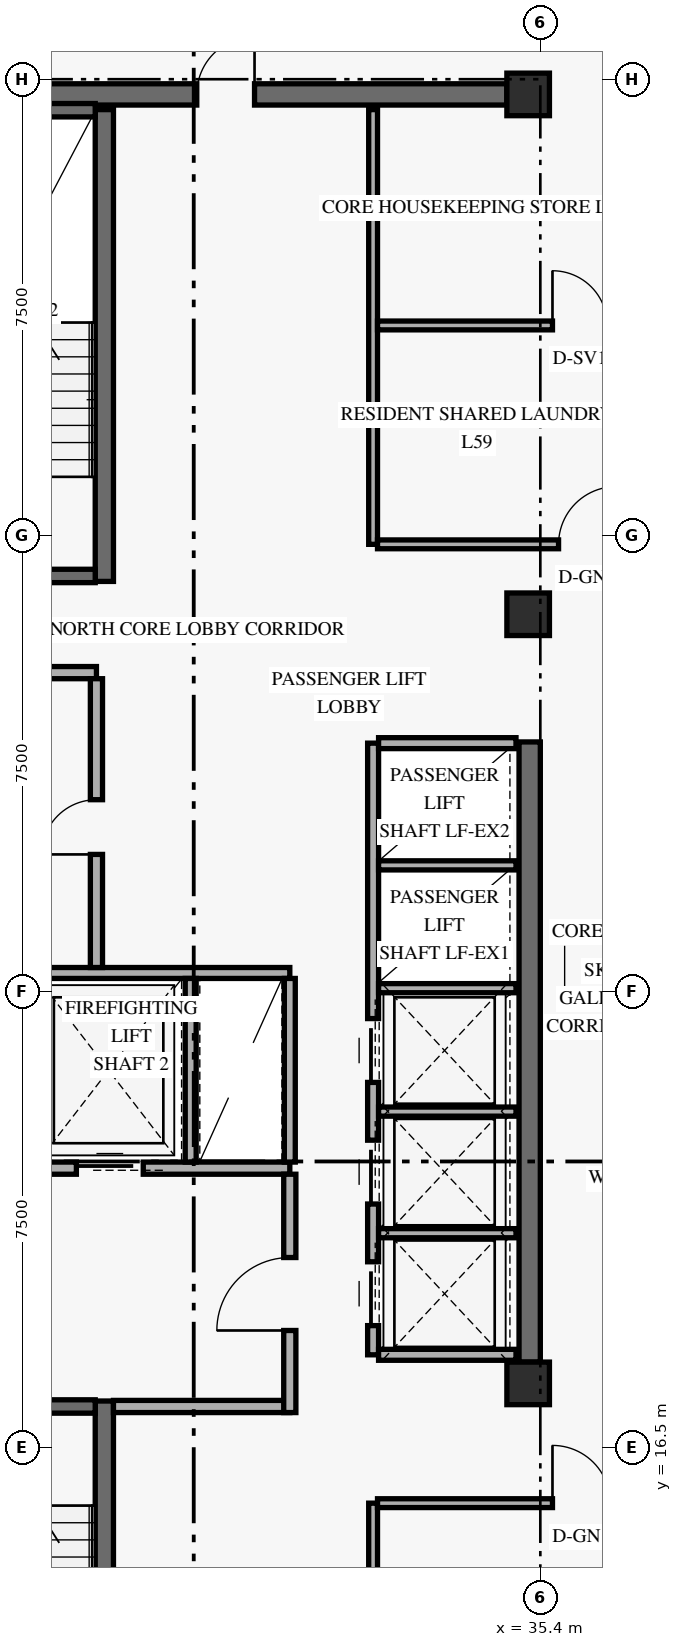
"""IFC4 building model, lengths in metres.
Left out: names, types, materials, properties, quantities, classifications, styles, units other than length and angle.
Written with IfcOpenShell. Run it as: python <this file> out.ifc"""

import sys

from ifc_helpers import new_model, si_unit, direction, frame, frame_2d, origin, origin_2d, place, context, subcontext, project, spatial, rectangle, extrude, element, fill, save


model = new_model("IFC4")
c1 = context("Model", 3, precision=1e-05, world=origin(), true_north=direction((0.0, 1.0)))
c2 = subcontext(c1, "Body", "Model", "MODEL_VIEW")
j1 = project(units=[si_unit("LENGTHUNIT", "METRE"), si_unit("PLANEANGLEUNIT", "RADIAN")], contexts=[c1])
p1 = place(None, origin())
s1 = spatial("IfcSite", under=j1, at=p1, CompositionType="ELEMENT")
p2 = place(p1, origin())
s2 = spatial("IfcBuilding", under=s1, at=p2, CompositionType="ELEMENT")
p3 = place(p2, frame((0.0, 0.0, 227.4)))
s3 = spatial("IfcBuildingStorey", under=s2, at=p3, CompositionType="ELEMENT", Elevation=227.4)
p4 = place(p3, frame((35.225, 17.9, 0.0), z_axis=(0.0, 0.0, 1.0), x_axis=(0.0, 1.0, 0.0)))
e1 = element("IfcWall", 1, at=p4, inside=s3, PredefinedType="SHEAR", context=c2, shape_type="SweptSolid", body=[
    extrude(rectangle(XDim=10.2, YDim=0.35, at=frame_2d((5.1, 0.0))), origin(), (0.0, 0.0, 1.0), 2.811),
])
p5 = place(p3, frame((24.55, 38.75, 0.0), z_axis=(0.0, 0.0, 1.0), x_axis=(1.0, 0.0, 0.0)))
e2 = element("IfcWall", 2, at=p5, inside=s3, PredefinedType="SHEAR", context=c2, shape_type="SweptSolid", body=[
    extrude(rectangle(XDim=10.3, YDim=0.35, at=frame_2d((5.15, 0.0))), origin(), (0.0, 0.0, 1.0), 3.35),
])
p6 = place(p5, frame((5.2, 0.0, 0.0)))
e3 = element("IfcOpeningElement", 3, at=p6, cuts=e2, PredefinedType="OPENING", context=c2, shape_type="SweptSolid", body=[
    extrude(rectangle(XDim=0.95, YDim=2.15, at=frame_2d((0.475, 1.075))), frame((0.0, 0.185, 0.0), z_axis=(0.0, -1.0, 0.0), x_axis=(1.0, 0.0, 0.0)), (0.0, 0.0, 1.0), 0.37),
])
p7 = place(p3, frame((28.23, 9.5, 0.0), z_axis=(0.0, 0.0, 1.0), x_axis=(0.0, 1.0, 0.0)))
e4 = element("IfcWall", 4, at=p7, inside=s3, PredefinedType="SHEAR", context=c2, shape_type="SweptSolid", body=[
    extrude(rectangle(XDim=7.76, YDim=0.3, at=frame_2d((3.88, 0.0))), origin(), (0.0, 0.0, 1.0), 3.35),
])
p8 = place(p3, frame((24.92, 17.17, 0.0), z_axis=(0.0, 0.0, 1.0), x_axis=(1.0, 0.0, 0.0)))
e5 = element("IfcWall", 5, at=p8, inside=s3, PredefinedType="SHEAR", context=c2, shape_type="SweptSolid", body=[
    extrude(rectangle(XDim=3.16, YDim=0.22, at=frame_2d((1.58, 0.0))), origin(), (0.0, 0.0, 1.0), 3.35),
])
p9 = place(p8, frame((0.78, 0.0, 0.0)))
e6 = element("IfcOpeningElement", 6, at=p9, cuts=e5, PredefinedType="OPENING", context=c2, shape_type="SweptSolid", body=[
    extrude(rectangle(XDim=1.05, YDim=2.15, at=frame_2d((0.525, 1.075))), frame((0.0, 0.12, 0.0), z_axis=(0.0, -1.0, 0.0), x_axis=(1.0, 0.0, 0.0)), (0.0, 0.0, 1.0), 0.24),
])
p10 = place(p3, frame((28.23, 30.74, 0.0), z_axis=(0.0, 0.0, 1.0), x_axis=(0.0, 1.0, 0.0)))
e7 = element("IfcWall", 7, at=p10, inside=s3, PredefinedType="SHEAR", context=c2, shape_type="SweptSolid", body=[
    extrude(rectangle(XDim=7.76, YDim=0.3, at=frame_2d((3.88, 0.0))), origin(), (0.0, 0.0, 1.0), 3.35),
])
p11 = place(p3, frame((24.92, 30.83, 0.0), z_axis=(0.0, 0.0, 1.0), x_axis=(1.0, 0.0, 0.0)))
e8 = element("IfcWall", 8, at=p11, inside=s3, PredefinedType="SHEAR", context=c2, shape_type="SweptSolid", body=[
    extrude(rectangle(XDim=3.16, YDim=0.22, at=frame_2d((1.58, 0.0))), origin(), (0.0, 0.0, 1.0), 3.35),
])
p12 = place(p11, frame((0.78, 0.0, 0.0)))
e9 = element("IfcOpeningElement", 9, at=p12, cuts=e8, PredefinedType="OPENING", context=c2, shape_type="SweptSolid", body=[
    extrude(rectangle(XDim=1.05, YDim=2.15, at=frame_2d((0.525, 1.075))), frame((0.0, 0.12, 0.0), z_axis=(0.0, -1.0, 0.0), x_axis=(1.0, 0.0, 0.0)), (0.0, 0.0, 1.0), 0.24),
])
p13 = place(p3, frame((24.92, 38.49, 0.0), z_axis=(0.0, 0.0, 1.0), x_axis=(1.0, 0.0, 0.0)))
e10 = element("IfcWall", 10, at=p13, inside=s3, PredefinedType="SHEAR", context=c2, shape_type="SweptSolid", body=[
    extrude(rectangle(XDim=3.16, YDim=0.22, at=frame_2d((1.58, 0.0))), origin(), (0.0, 0.0, 1.0), 3.35),
])
for number, where, z_axis, x_axis in (
    (11, (35.2, 17.55, 0.0), (0.0, 0.0, 1.0), (1.0, 0.0, 0.0)),
    (12, (35.2, 30.2, 0.0), (0.0, 0.0, 1.0), (1.0, 0.0, 0.0)),
    (13, (35.2, 38.75, 0.0), (0.0, 0.0, 1.0), (1.0, 0.0, 0.0)),
):
    element("IfcColumn", number, at=place(p3, frame(where, z_axis=z_axis, x_axis=x_axis)), inside=s3, PredefinedType="COLUMN", context=c2, shape_type="SweptSolid", body=[
        extrude(rectangle(XDim=0.7, YDim=0.7, at=origin_2d()), origin(), (0.0, 0.0, 1.0), 3.6),
    ])
p14 = place(p3, frame((24.45, 21.09, 0.0), z_axis=(0.0, 0.0, 1.0), x_axis=(1.0, 0.0, 0.0)))
e14 = element("IfcWall", 14, at=p14, inside=s3, PredefinedType="STANDARD", context=c2, shape_type="SweptSolid", body=[
    extrude(rectangle(XDim=6.83, YDim=0.2, at=frame_2d((3.415, 0.0))), origin(), (0.0, 0.0, 1.0), 3.35),
])
p15 = place(p14, frame((0.72, 0.0, 0.0)))
e15 = element("IfcOpeningElement", 15, at=p15, cuts=e14, PredefinedType="OPENING", context=c2, shape_type="SweptSolid", body=[
    extrude(rectangle(XDim=1.1, YDim=2.2, at=frame_2d((0.55, 1.1))), frame((0.0, 0.11, 0.0), z_axis=(0.0, -1.0, 0.0), x_axis=(1.0, 0.0, 0.0)), (0.0, 0.0, 1.0), 0.22),
])
p16 = place(p14, frame((3.32, 0.0, 0.0)))
e16 = element("IfcOpeningElement", 16, at=p16, cuts=e14, PredefinedType="OPENING", context=c2, shape_type="SweptSolid", body=[
    extrude(rectangle(XDim=1.1, YDim=2.2, at=frame_2d((0.55, 1.1))), frame((0.0, 0.11, 0.0), z_axis=(0.0, -1.0, 0.0), x_axis=(1.0, 0.0, 0.0)), (0.0, 0.0, 1.0), 0.22),
])
p17 = place(p3, frame((28.38, 17.17, 0.0), z_axis=(0.0, 0.0, 1.0), x_axis=(1.0, 0.0, 0.0)))
e17 = element("IfcWall", 17, at=p17, inside=s3, PredefinedType="STANDARD", context=c2, shape_type="SweptSolid", body=[
    extrude(rectangle(XDim=2.9, YDim=0.2, at=frame_2d((1.45, 0.0))), origin(), (0.0, 0.0, 1.0), 3.35),
])
p18 = place(p3, frame((31.28, 17.07, 0.0), z_axis=(0.0, 0.0, 1.0), x_axis=(0.0, 1.0, 0.0)))
e18 = element("IfcWall", 18, at=p18, inside=s3, PredefinedType="STANDARD", context=c2, shape_type="SweptSolid", body=[
    extrude(rectangle(XDim=3.92, YDim=0.2, at=frame_2d((1.96, 0.0))), origin(), (0.0, 0.0, 1.0), 2.793),
])
p19 = place(p18, frame((1.35, 0.0, 0.0)))
e19 = element("IfcOpeningElement", 19, at=p19, cuts=e18, PredefinedType="OPENING", context=c2, shape_type="SweptSolid", body=[
    extrude(rectangle(XDim=1.2, YDim=2.15, at=frame_2d((0.6, 1.075))), frame((0.0, 0.11, 0.0), z_axis=(0.0, -1.0, 0.0), x_axis=(1.0, 0.0, 0.0)), (0.0, 0.0, 1.0), 0.22),
])
p20 = place(p3, frame((24.45, 24.3, 0.0), z_axis=(0.0, 0.0, 1.0), x_axis=(1.0, 0.0, 0.0)))
e20 = element("IfcWall", 20, at=p20, inside=s3, PredefinedType="STANDARD", context=c2, shape_type="SweptSolid", body=[
    extrude(rectangle(XDim=6.83, YDim=0.18, at=frame_2d((3.415, 0.0))), origin(), (0.0, 0.0, 1.0), 3.35),
])
for number, where, z_axis, x_axis in (
    (21, (29.65, 21.19, 0.0), (0.0, 0.0, 1.0), (0.0, 1.0, 0.0)),
    (22, (31.28, 21.19, 0.0), (0.0, 0.0, 1.0), (0.0, 1.0, 0.0)),
):
    element("IfcWall", number, at=place(p3, frame(where, z_axis=z_axis, x_axis=x_axis)), inside=s3, PredefinedType="STANDARD", context=c2, shape_type="SweptSolid", body=[
        extrude(rectangle(XDim=3.02, YDim=0.18, at=frame_2d((1.51, 0.0))), origin(), (0.0, 0.0, 1.0), 3.35),
    ])
p21 = place(p3, frame((24.45, 29.24, 0.0), z_axis=(0.0, 0.0, 1.0), x_axis=(1.0, 0.0, 0.0)))
e23 = element("IfcWall", 23, at=p21, inside=s3, PredefinedType="STANDARD", context=c2, shape_type="SweptSolid", body=[
    extrude(rectangle(XDim=3.65, YDim=0.2, at=frame_2d((1.825, 0.0))), origin(), (0.0, 0.0, 1.0), 3.35),
])
p22 = place(p3, frame((28.1, 24.39, 0.0), z_axis=(0.0, 0.0, 1.0), x_axis=(0.0, 1.0, 0.0)))
e24 = element("IfcWall", 24, at=p22, inside=s3, PredefinedType="STANDARD", context=c2, shape_type="SweptSolid", body=[
    extrude(rectangle(XDim=4.75, YDim=0.2, at=frame_2d((2.375, 0.0))), origin(), (0.0, 0.0, 1.0), 3.35),
])
p23 = place(p22, frame((1.86, 0.0, 0.0)))
e25 = element("IfcOpeningElement", 25, at=p23, cuts=e24, PredefinedType="OPENING", context=c2, shape_type="SweptSolid", body=[
    extrude(rectangle(XDim=0.9, YDim=2.1, at=frame_2d((0.45, 1.05))), frame((0.0, 0.11, 0.0), z_axis=(0.0, -1.0, 0.0), x_axis=(1.0, 0.0, 0.0)), (0.0, 0.0, 1.0), 0.22),
])
p24 = place(p3, frame((32.65, 18.02, 0.0), z_axis=(0.0, 0.0, 1.0), x_axis=(0.0, 1.0, 0.0)))
e26 = element("IfcWall", 26, at=p24, inside=s3, PredefinedType="STANDARD", context=c2, shape_type="SweptSolid", body=[
    extrude(rectangle(XDim=10.06, YDim=0.18, at=frame_2d((5.03, 0.0))), origin(), (0.0, 0.0, 1.0), 3.35),
])
p25 = place(p24, frame((0.48, 0.0, 0.0)))
e27 = element("IfcOpeningElement", 27, at=p25, cuts=e26, PredefinedType="OPENING", context=c2, shape_type="SweptSolid", body=[
    extrude(rectangle(XDim=1.05, YDim=2.2, at=frame_2d((0.525, 1.1))), frame((0.0, 0.1, 0.0), z_axis=(0.0, -1.0, 0.0), x_axis=(1.0, 0.0, 0.0)), (0.0, 0.0, 1.0), 0.2),
])
p26 = place(p24, frame((2.48, 0.0, 0.0)))
e28 = element("IfcOpeningElement", 28, at=p26, cuts=e26, PredefinedType="OPENING", context=c2, shape_type="SweptSolid", body=[
    extrude(rectangle(XDim=1.05, YDim=2.2, at=frame_2d((0.525, 1.1))), frame((0.0, 0.1, 0.0), z_axis=(0.0, -1.0, 0.0), x_axis=(1.0, 0.0, 0.0)), (0.0, 0.0, 1.0), 0.2),
])
p27 = place(p24, frame((4.48, 0.0, 0.0)))
e29 = element("IfcOpeningElement", 29, at=p27, cuts=e26, PredefinedType="OPENING", context=c2, shape_type="SweptSolid", body=[
    extrude(rectangle(XDim=1.05, YDim=2.2, at=frame_2d((0.525, 1.1))), frame((0.0, 0.1, 0.0), z_axis=(0.0, -1.0, 0.0), x_axis=(1.0, 0.0, 0.0)), (0.0, 0.0, 1.0), 0.2),
])
for number, where, z_axis, x_axis in (
    (30, (32.74, 18.02, 0.0), (0.0, 0.0, 1.0), (1.0, 0.0, 0.0)),
    (31, (32.74, 28.08, 0.0), (0.0, 0.0, 1.0), (1.0, 0.0, 0.0)),
):
    element("IfcWall", number, at=place(p3, frame(where, z_axis=z_axis, x_axis=x_axis)), inside=s3, PredefinedType="STANDARD", context=c2, shape_type="SweptSolid", body=[
        extrude(rectangle(XDim=2.26, YDim=0.18, at=frame_2d((1.13, 0.0))), origin(), (0.0, 0.0, 1.0), 3.35),
    ])
for number, where, z_axis, x_axis in (
    (32, (32.74, 20.02, 0.0), (0.0, 0.0, 1.0), (1.0, 0.0, 0.0)),
    (33, (32.74, 22.02, 0.0), (0.0, 0.0, 1.0), (1.0, 0.0, 0.0)),
    (34, (32.74, 24.05, 0.0), (0.0, 0.0, 1.0), (1.0, 0.0, 0.0)),
    (35, (32.74, 26.07, 0.0), (0.0, 0.0, 1.0), (1.0, 0.0, 0.0)),
):
    element("IfcWall", number, at=place(p3, frame(where, z_axis=z_axis, x_axis=x_axis)), inside=s3, PredefinedType="STANDARD", context=c2, shape_type="SweptSolid", body=[
        extrude(rectangle(XDim=2.26, YDim=0.15, at=frame_2d((1.13, 0.0))), origin(), (0.0, 0.0, 1.0), 3.35),
    ])
p28 = place(p3, frame((32.65, 9.5, 0.0), z_axis=(0.0, 0.0, 1.0), x_axis=(0.0, 1.0, 0.0)))
e36 = element("IfcWall", 36, at=p28, inside=s3, PredefinedType="PARTITIONING", context=c2, shape_type="SweptSolid", body=[
    extrude(rectangle(XDim=6.08, YDim=0.145, at=frame_2d((3.04, 0.0))), origin(), (0.0, 0.0, 1.0), 3.35),
])
p29 = place(p3, frame((32.722, 15.58, 0.0), z_axis=(0.0, 0.0, 1.0), x_axis=(1.0, 0.0, 0.0)))
e37 = element("IfcWall", 37, at=p29, inside=s3, PredefinedType="PARTITIONING", context=c2, shape_type="SweptSolid", body=[
    extrude(rectangle(XDim=5.628, YDim=0.145, at=frame_2d((2.814, 0.0))), origin(), (0.0, 0.0, 1.0), 2.793),
])
p30 = place(p29, frame((2.877, 0.0, 0.0)))
e38 = element("IfcOpeningElement", 38, at=p30, cuts=e37, PredefinedType="OPENING", context=c2, shape_type="SweptSolid", body=[
    extrude(rectangle(XDim=0.95, YDim=2.15, at=frame_2d((0.475, 1.075))), frame((0.0, 0.083, 0.0), z_axis=(0.0, -1.0, 0.0), x_axis=(1.0, 0.0, 0.0)), (0.0, 0.0, 1.0), 0.165),
])
p31 = place(p3, frame((32.65, 31.35, 0.0), z_axis=(0.0, 0.0, 1.0), x_axis=(0.0, 1.0, 0.0)))
e39 = element("IfcWall", 39, at=p31, inside=s3, PredefinedType="PARTITIONING", context=c2, shape_type="SweptSolid", body=[
    extrude(rectangle(XDim=7.15, YDim=0.145, at=frame_2d((3.575, 0.0))), origin(), (0.0, 0.0, 1.0), 3.35),
])
p32 = place(p3, frame((32.722, 31.35, 0.0), z_axis=(0.0, 0.0, 1.0), x_axis=(1.0, 0.0, 0.0)))
e40 = element("IfcWall", 40, at=p32, inside=s3, PredefinedType="PARTITIONING", context=c2, shape_type="SweptSolid", body=[
    extrude(rectangle(XDim=6.177, YDim=0.145, at=frame_2d((3.089, 0.0))), origin(), (0.0, 0.0, 1.0), 2.793),
])
p33 = place(p32, frame((2.978, 0.0, 0.0)))
e41 = element("IfcOpeningElement", 41, at=p33, cuts=e40, PredefinedType="OPENING", context=c2, shape_type="SweptSolid", body=[
    extrude(rectangle(XDim=0.95, YDim=2.15, at=frame_2d((0.475, 1.075))), frame((0.0, 0.083, 0.0), z_axis=(0.0, -1.0, 0.0), x_axis=(1.0, 0.0, 0.0)), (0.0, 0.0, 1.0), 0.165),
])
p34 = place(p3, frame((32.722, 34.95, 0.0), z_axis=(0.0, 0.0, 1.0), x_axis=(1.0, 0.0, 0.0)))
e42 = element("IfcWall", 42, at=p34, inside=s3, PredefinedType="PARTITIONING", context=c2, shape_type="SweptSolid", body=[
    extrude(rectangle(XDim=6.105, YDim=0.145, at=frame_2d((3.052, 0.0))), origin(), (0.0, 0.0, 1.0), 2.793),
])
p35 = place(p34, frame((2.877, 0.0, 0.0)))
e43 = element("IfcOpeningElement", 43, at=p35, cuts=e42, PredefinedType="OPENING", context=c2, shape_type="SweptSolid", body=[
    extrude(rectangle(XDim=0.9, YDim=2.1, at=frame_2d((0.45, 1.05))), frame((0.0, 0.083, 0.0), z_axis=(0.0, -1.0, 0.0), x_axis=(1.0, 0.0, 0.0)), (0.0, 0.0, 1.0), 0.165),
])
p36 = place(p16, origin())
e44 = element("IfcDoor", 44, at=p36, inside=s3, OperationType="SLIDING_TO_LEFT", PredefinedType="DOOR", context=c2, shape_type="SweptSolid", body=[
    extrude(rectangle(XDim=1.1, YDim=2.2, at=frame_2d((0.55, 1.1))), frame((0.0, 0.025, 0.0), z_axis=(0.0, -1.0, 0.0), x_axis=(1.0, 0.0, 0.0)), (0.0, 0.0, 1.0), 0.05),
])
fill(e16, e44)
p37 = place(p19, origin())
e45 = element("IfcDoor", 45, at=p37, inside=s3, OperationType="SINGLE_SWING_LEFT", PredefinedType="DOOR", context=c2, shape_type="SweptSolid", body=[
    extrude(rectangle(XDim=1.2, YDim=2.15, at=frame_2d((0.6, 1.075))), frame((0.0, 0.025, 0.0), z_axis=(0.0, -1.0, 0.0), x_axis=(1.0, 0.0, 0.0)), (0.0, 0.0, 1.0), 0.05),
])
fill(e19, e45)
p38 = place(p23, origin())
e46 = element("IfcDoor", 46, at=p38, inside=s3, OperationType="SINGLE_SWING_LEFT", PredefinedType="DOOR", context=c2, shape_type="SweptSolid", body=[
    extrude(rectangle(XDim=0.9, YDim=2.1, at=frame_2d((0.45, 1.05))), frame((0.0, 0.025, 0.0), z_axis=(0.0, -1.0, 0.0), x_axis=(1.0, 0.0, 0.0)), (0.0, 0.0, 1.0), 0.05),
])
fill(e25, e46)
p39 = place(p25, origin())
e47 = element("IfcDoor", 47, at=p39, inside=s3, OperationType="SLIDING_TO_LEFT", PredefinedType="DOOR", context=c2, shape_type="SweptSolid", body=[
    extrude(rectangle(XDim=1.05, YDim=2.2, at=frame_2d((0.525, 1.1))), frame((0.0, 0.025, 0.0), z_axis=(0.0, -1.0, 0.0), x_axis=(1.0, 0.0, 0.0)), (0.0, 0.0, 1.0), 0.05),
])
fill(e27, e47)
p40 = place(p26, origin())
e48 = element("IfcDoor", 48, at=p40, inside=s3, OperationType="SLIDING_TO_LEFT", PredefinedType="DOOR", context=c2, shape_type="SweptSolid", body=[
    extrude(rectangle(XDim=1.05, YDim=2.2, at=frame_2d((0.525, 1.1))), frame((0.0, 0.025, 0.0), z_axis=(0.0, -1.0, 0.0), x_axis=(1.0, 0.0, 0.0)), (0.0, 0.0, 1.0), 0.05),
])
fill(e28, e48)
p41 = place(p27, origin())
e49 = element("IfcDoor", 49, at=p41, inside=s3, OperationType="SLIDING_TO_LEFT", PredefinedType="DOOR", context=c2, shape_type="SweptSolid", body=[
    extrude(rectangle(XDim=1.05, YDim=2.2, at=frame_2d((0.525, 1.1))), frame((0.0, 0.025, 0.0), z_axis=(0.0, -1.0, 0.0), x_axis=(1.0, 0.0, 0.0)), (0.0, 0.0, 1.0), 0.05),
])
fill(e29, e49)
p42 = place(p30, origin())
e50 = element("IfcDoor", 50, at=p42, inside=s3, OperationType="SINGLE_SWING_LEFT", PredefinedType="DOOR", context=c2, shape_type="SweptSolid", body=[
    extrude(rectangle(XDim=0.95, YDim=2.15, at=frame_2d((0.475, 1.075))), frame((0.0, 0.025, 0.0), z_axis=(0.0, -1.0, 0.0), x_axis=(1.0, 0.0, 0.0)), (0.0, 0.0, 1.0), 0.05),
])
fill(e38, e50)
p43 = place(p33, origin())
e51 = element("IfcDoor", 51, at=p43, inside=s3, OperationType="SINGLE_SWING_RIGHT", PredefinedType="DOOR", context=c2, shape_type="SweptSolid", body=[
    extrude(rectangle(XDim=0.95, YDim=2.15, at=frame_2d((0.475, 1.075))), frame((0.0, 0.025, 0.0), z_axis=(0.0, -1.0, 0.0), x_axis=(1.0, 0.0, 0.0)), (0.0, 0.0, 1.0), 0.05),
])
fill(e41, e51)
p44 = place(p35, origin())
e52 = element("IfcDoor", 52, at=p44, inside=s3, OperationType="SINGLE_SWING_LEFT", PredefinedType="DOOR", context=c2, shape_type="SweptSolid", body=[
    extrude(rectangle(XDim=0.9, YDim=2.1, at=frame_2d((0.45, 1.05))), frame((0.0, 0.025, 0.0), z_axis=(0.0, -1.0, 0.0), x_axis=(1.0, 0.0, 0.0)), (0.0, 0.0, 1.0), 0.05),
])
fill(e43, e52)
p45 = place(p6, origin())
e53 = element("IfcDoor", 53, at=p45, inside=s3, OperationType="SINGLE_SWING_RIGHT", PredefinedType="DOOR", context=c2, shape_type="SweptSolid", body=[
    extrude(rectangle(XDim=0.95, YDim=2.15, at=frame_2d((0.475, 1.075))), frame((0.0, 0.025, 0.0), z_axis=(0.0, -1.0, 0.0), x_axis=(1.0, 0.0, 0.0)), (0.0, 0.0, 1.0), 0.05),
])
fill(e3, e53)
save(model, sys.argv[1])
